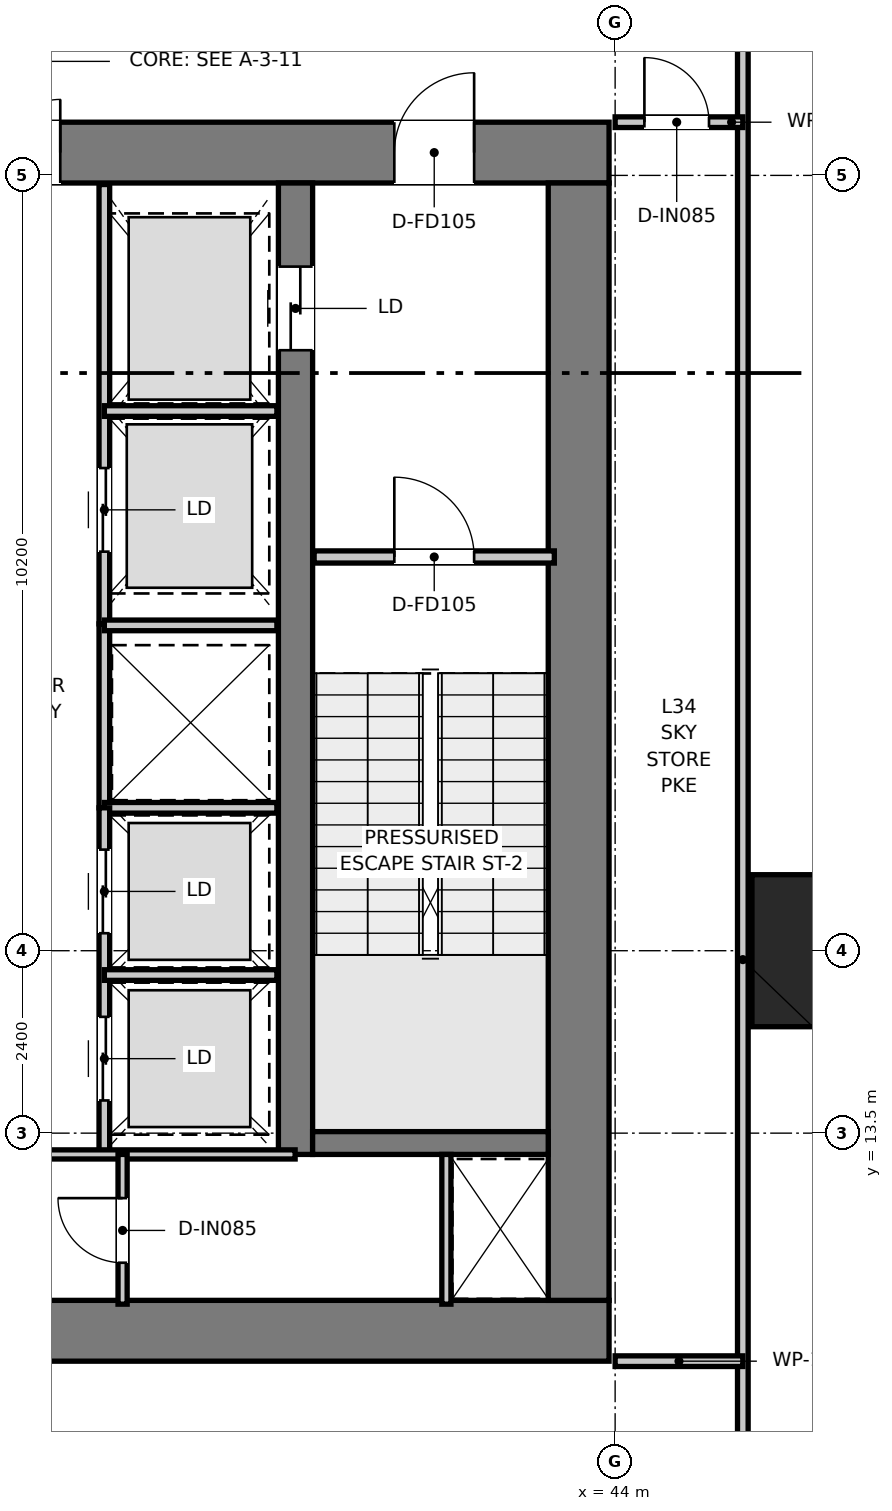
"""IFC4 building model, lengths in metres.
Left out: names, types, materials, properties, quantities, classifications, styles, units other than length and angle.
Written with IfcOpenShell. Run it as: python <this file> out.ifc"""

import sys

from ifc_helpers import new_model, si_unit, direction, frame, frame_2d, origin, origin_2d, place, context, subcontext, project, spatial, rectangle, extrude, source, transform, mapped, element, fill, save


model = new_model("IFC4")
c1 = context("Model", 3, precision=1e-05, world=origin(), true_north=direction((0.0, 1.0)))
c2 = subcontext(c1, "Body", "Model", "MODEL_VIEW")
j1 = project(units=[si_unit("LENGTHUNIT", "METRE"), si_unit("PLANEANGLEUNIT", "RADIAN")], contexts=[c1])
p1 = place(None, origin())
s1 = spatial("IfcSite", under=j1, at=p1, CompositionType="ELEMENT")
p2 = place(p1, origin())
s2 = spatial("IfcBuilding", under=s1, at=p2, CompositionType="ELEMENT")
p3 = place(p2, frame((0.0, 0.0, 141.4)))
s3 = spatial("IfcBuildingStorey", under=s2, at=p3, CompositionType="ELEMENT", Elevation=141.4)
p4 = place(p3, frame((28.08, 10.9, 0.0), z_axis=(0.0, 0.0, 1.0), x_axis=(1.0, 0.0, 0.0)))
e1 = element("IfcWall", 1, at=p4, inside=s3, PredefinedType="SHEAR", context=c2, shape_type="SweptSolid", body=[
    extrude(rectangle(XDim=15.84, YDim=0.8, at=frame_2d((7.92, 0.0))), origin(), (0.0, 0.0, 1.0), 4.8),
])
p5 = place(p3, frame((28.08, 26.4, 0.0), z_axis=(0.0, 0.0, 1.0), x_axis=(1.0, 0.0, 0.0)))
e2 = element("IfcWall", 2, at=p5, inside=s3, PredefinedType="SHEAR", context=c2, shape_type="SweptSolid", body=[
    extrude(rectangle(XDim=15.84, YDim=0.8, at=frame_2d((7.92, 0.0))), origin(), (0.0, 0.0, 1.0), 4.8),
])
p6 = place(p5, frame((7.22, 0.0, 0.0)))
e3 = element("IfcOpeningElement", 3, at=p6, cuts=e2, PredefinedType="OPENING", context=c2, shape_type="SweptSolid", body=[
    extrude(rectangle(XDim=1.4, YDim=2.2, at=frame_2d((0.7, 1.1))), frame((0.0, 0.41, 0.0), z_axis=(0.0, -1.0, 0.0), x_axis=(1.0, 0.0, 0.0)), (0.0, 0.0, 1.0), 0.82),
])
p7 = place(p5, frame((1.775, 0.0, 0.0)))
e4 = element("IfcOpeningElement", 4, at=p7, cuts=e2, PredefinedType="OPENING", context=c2, shape_type="SweptSolid", body=[
    extrude(rectangle(XDim=1.05, YDim=2.1, at=frame_2d((0.525, 1.05))), frame((0.0, 0.41, 0.0), z_axis=(0.0, -1.0, 0.0), x_axis=(1.0, 0.0, 0.0)), (0.0, 0.0, 1.0), 0.82),
])
p8 = place(p5, frame((13.015, 0.0, 0.0)))
e5 = element("IfcOpeningElement", 5, at=p8, cuts=e2, PredefinedType="OPENING", context=c2, shape_type="SweptSolid", body=[
    extrude(rectangle(XDim=1.05, YDim=2.1, at=frame_2d((0.525, 1.05))), frame((0.0, 0.41, 0.0), z_axis=(0.0, -1.0, 0.0), x_axis=(1.0, 0.0, 0.0)), (0.0, 0.0, 1.0), 0.82),
])
p9 = place(p3, frame((43.52, 11.3, 0.0), z_axis=(0.0, 0.0, 1.0), x_axis=(0.0, 1.0, 0.0)))
e6 = element("IfcWall", 6, at=p9, inside=s3, PredefinedType="SHEAR", context=c2, shape_type="SweptSolid", body=[
    extrude(rectangle(XDim=14.7, YDim=0.8, at=frame_2d((7.35, 0.0))), origin(), (0.0, 0.0, 1.0), 4.8),
])
p10 = place(p3, frame((39.795, 13.22, 0.0), z_axis=(0.0, 0.0, 1.0), x_axis=(0.0, 1.0, 0.0)))
e7 = element("IfcWall", 7, at=p10, inside=s3, PredefinedType="SHEAR", context=c2, shape_type="SweptSolid", body=[
    extrude(rectangle(XDim=12.78, YDim=0.45, at=frame_2d((6.39, 0.0))), origin(), (0.0, 0.0, 1.0), 4.8),
])
p11 = place(p10, frame((10.58, 0.0, 0.0)))
e8 = element("IfcOpeningElement", 8, at=p11, cuts=e7, PredefinedType="OPENING", context=c2, shape_type="SweptSolid", body=[
    extrude(rectangle(XDim=1.1, YDim=2.15, at=frame_2d((0.55, 1.075))), frame((0.0, 0.235, 0.0), z_axis=(0.0, -1.0, 0.0), x_axis=(1.0, 0.0, 0.0)), (0.0, 0.0, 1.0), 0.47),
])
p12 = place(p3, frame((40.02, 13.37, 0.0), z_axis=(0.0, 0.0, 1.0), x_axis=(1.0, 0.0, 0.0)))
e9 = element("IfcWall", 9, at=p12, inside=s3, PredefinedType="SHEAR", context=c2, shape_type="SweptSolid", body=[
    extrude(rectangle(XDim=3.1, YDim=0.3, at=frame_2d((1.55, 0.0))), origin(), (0.0, 0.0, 1.0), 4.8),
])
m1 = source(origin(), c2, "Body", "SweptSolid", [
    extrude(rectangle(XDim=2.0, YDim=2.0, at=origin_2d()), origin(), (0.0, 0.0, 1.0), 4.8),
])
p13 = place(p3, frame((46.8, 15.9, 0.0), z_axis=(0.0, 0.0, 1.0), x_axis=(1.0, 0.0, 0.0)))
e10 = element("IfcColumn", 10, at=p13, inside=s3, PredefinedType="USERDEFINED", context=c2, shape_type="MappedRepresentation", body=[
    mapped(m1, transform((0.0, 0.0, 0.0), x_axis=(1.0, 0.0, 0.0), y_axis=(0.0, 1.0, 0.0), z_axis=(0.0, 0.0, 1.0), scale=1.0)),
])
p14 = place(p3, frame((40.04, 21.08, 0.0), z_axis=(0.0, 0.0, 1.0), x_axis=(1.0, 0.0, 0.0)))
e11 = element("IfcWall", 11, at=p14, inside=s3, PredefinedType="PARTITIONING", context=c2, shape_type="SweptSolid", body=[
    extrude(rectangle(XDim=3.16, YDim=0.16, at=frame_2d((1.58, 0.0))), origin(), (0.0, 0.0, 1.0), 4.52),
])
p15 = place(p14, frame((1.055, 0.0, 0.0)))
e12 = element("IfcOpeningElement", 12, at=p15, cuts=e11, PredefinedType="OPENING", context=c2, shape_type="SweptSolid", body=[
    extrude(rectangle(XDim=1.05, YDim=2.1, at=frame_2d((0.525, 1.05))), frame((0.0, 0.09, 0.0), z_axis=(0.0, -1.0, 0.0), x_axis=(1.0, 0.0, 0.0)), (0.0, 0.0, 1.0), 0.18),
])
p16 = place(p3, frame((37.28, 20.2, 0.0), z_axis=(0.0, 0.0, 1.0), x_axis=(0.0, 1.0, 0.0)))
e13 = element("IfcWall", 13, at=p16, inside=s3, PredefinedType="PARTITIONING", context=c2, shape_type="SweptSolid", body=[
    extrude(rectangle(XDim=5.78, YDim=0.14, at=frame_2d((2.89, 0.0))), origin(), (0.0, 0.0, 1.0), 3.52),
])
p17 = place(p16, frame((0.95, 0.0, 0.0)))
e14 = element("IfcOpeningElement", 14, at=p17, cuts=e13, PredefinedType="OPENING", context=c2, shape_type="SweptSolid", body=[
    extrude(rectangle(XDim=1.1, YDim=2.15, at=frame_2d((0.55, 1.075))), frame((0.0, 0.08, 0.0), z_axis=(0.0, -1.0, 0.0), x_axis=(1.0, 0.0, 0.0)), (0.0, 0.0, 1.0), 0.16),
])
p18 = place(p3, frame((37.28, 23.0, 0.0), z_axis=(0.0, 0.0, 1.0), x_axis=(1.0, 0.0, 0.0)))
e15 = element("IfcWall", 15, at=p18, inside=s3, PredefinedType="PARTITIONING", context=c2, shape_type="SweptSolid", body=[
    extrude(rectangle(XDim=2.27, YDim=0.14, at=frame_2d((1.135, 0.0))), origin(), (0.0, 0.0, 1.0), 3.52),
])
p19 = place(p3, frame((37.28, 17.78, 0.0), z_axis=(0.0, 0.0, 1.0), x_axis=(0.0, 1.0, 0.0)))
e16 = element("IfcWall", 16, at=p19, inside=s3, PredefinedType="PARTITIONING", context=c2, shape_type="SweptSolid", body=[
    extrude(rectangle(XDim=2.42, YDim=0.14, at=frame_2d((1.21, 0.0))), origin(), (0.0, 0.0, 1.0), 4.52),
])
for number, where, z_axis, x_axis in (
    (17, (37.28, 17.78, 0.0), (0.0, 0.0, 1.0), (1.0, 0.0, 0.0)),
    (18, (37.28, 20.18, 0.0), (0.0, 0.0, 1.0), (1.0, 0.0, 0.0)),
):
    element("IfcWall", number, at=place(p3, frame(where, z_axis=z_axis, x_axis=x_axis)), inside=s3, PredefinedType="PARTITIONING", context=c2, shape_type="SweptSolid", body=[
        extrude(rectangle(XDim=2.27, YDim=0.14, at=frame_2d((1.135, 0.0))), origin(), (0.0, 0.0, 1.0), 4.52),
    ])
p20 = place(p3, frame((37.28, 13.22, 0.0), z_axis=(0.0, 0.0, 1.0), x_axis=(0.0, 1.0, 0.0)))
e19 = element("IfcWall", 19, at=p20, inside=s3, PredefinedType="PARTITIONING", context=c2, shape_type="SweptSolid", body=[
    extrude(rectangle(XDim=4.56, YDim=0.14, at=frame_2d((2.28, 0.0))), origin(), (0.0, 0.0, 1.0), 4.52),
])
p21 = place(p20, frame((0.71, 0.0, 0.0)))
e20 = element("IfcOpeningElement", 20, at=p21, cuts=e19, PredefinedType="OPENING", context=c2, shape_type="SweptSolid", body=[
    extrude(rectangle(XDim=1.1, YDim=2.15, at=frame_2d((0.55, 1.075))), frame((0.0, 0.08, 0.0), z_axis=(0.0, -1.0, 0.0), x_axis=(1.0, 0.0, 0.0)), (0.0, 0.0, 1.0), 0.16),
])
p22 = place(p20, frame((2.91, 0.0, 0.0)))
e21 = element("IfcOpeningElement", 21, at=p22, cuts=e19, PredefinedType="OPENING", context=c2, shape_type="SweptSolid", body=[
    extrude(rectangle(XDim=1.1, YDim=2.15, at=frame_2d((0.55, 1.075))), frame((0.0, 0.08, 0.0), z_axis=(0.0, -1.0, 0.0), x_axis=(1.0, 0.0, 0.0)), (0.0, 0.0, 1.0), 0.16),
])
p23 = place(p3, frame((37.28, 15.58, 0.0), z_axis=(0.0, 0.0, 1.0), x_axis=(1.0, 0.0, 0.0)))
e22 = element("IfcWall", 22, at=p23, inside=s3, PredefinedType="PARTITIONING", context=c2, shape_type="SweptSolid", body=[
    extrude(rectangle(XDim=2.27, YDim=0.14, at=frame_2d((1.135, 0.0))), origin(), (0.0, 0.0, 1.0), 4.52),
])
p24 = place(p3, frame((41.78, 11.25, 0.0), z_axis=(0.0, 0.0, 1.0), x_axis=(0.0, 1.0, 0.0)))
e23 = element("IfcWall", 23, at=p24, inside=s3, PredefinedType="PARTITIONING", context=c2, shape_type="SweptSolid", body=[
    extrude(rectangle(XDim=1.97, YDim=0.12, at=frame_2d((0.985, 0.0))), origin(), (0.0, 0.0, 1.0), 4.52),
])
p25 = place(p3, frame((32.21, 13.22, 0.0), z_axis=(0.0, 0.0, 1.0), x_axis=(1.0, 0.0, 0.0)))
e24 = element("IfcWall", 24, at=p25, inside=s3, PredefinedType="PARTITIONING", context=c2, shape_type="SweptSolid", body=[
    extrude(rectangle(XDim=7.58, YDim=0.12, at=frame_2d((3.79, 0.0))), origin(), (0.0, 0.0, 1.0), 4.52),
])
p26 = place(p25, frame((3.365, 0.0, 0.0)))
e25 = element("IfcOpeningElement", 25, at=p26, cuts=e24, PredefinedType="OPENING", context=c2, shape_type="SweptSolid", body=[
    extrude(rectangle(XDim=0.85, YDim=2.1, at=frame_2d((0.425, 1.05))), frame((0.0, 0.07, 0.0), z_axis=(0.0, -1.0, 0.0), x_axis=(1.0, 0.0, 0.0)), (0.0, 0.0, 1.0), 0.14),
])
p27 = place(p3, frame((37.52, 11.25, 0.0), z_axis=(0.0, 0.0, 1.0), x_axis=(0.0, 1.0, 0.0)))
e26 = element("IfcWall", 26, at=p27, inside=s3, PredefinedType="PARTITIONING", context=c2, shape_type="SweptSolid", body=[
    extrude(rectangle(XDim=1.97, YDim=0.12, at=frame_2d((0.985, 0.0))), origin(), (0.0, 0.0, 1.0), 4.52),
])
p28 = place(p27, frame((0.545, 0.0, 0.0)))
e27 = element("IfcOpeningElement", 27, at=p28, cuts=e26, PredefinedType="OPENING", context=c2, shape_type="SweptSolid", body=[
    extrude(rectangle(XDim=0.85, YDim=2.1, at=frame_2d((0.425, 1.05))), frame((0.0, 0.07, 0.0), z_axis=(0.0, -1.0, 0.0), x_axis=(1.0, 0.0, 0.0)), (0.0, 0.0, 1.0), 0.14),
])
p29 = place(p3, frame((45.68, 0.765, 0.0), z_axis=(0.0, 0.0, 1.0), x_axis=(0.0, 1.0, 0.0)))
e28 = element("IfcWall", 28, at=p29, inside=s3, PredefinedType="PARTITIONING", context=c2, shape_type="SweptSolid", body=[
    extrude(rectangle(XDim=47.145, YDim=0.14, at=frame_2d((23.573, 0.0))), origin(), (0.0, 0.0, 1.0), 3.82),
])
p30 = place(p29, frame((30.185, 0.0, 0.0)))
e29 = element("IfcOpeningElement", 29, at=p30, cuts=e28, PredefinedType="OPENING", context=c2, shape_type="SweptSolid", body=[
    extrude(rectangle(XDim=1.1, YDim=2.15, at=frame_2d((0.55, 1.075))), frame((0.0, 0.08, 0.0), z_axis=(0.0, -1.0, 0.0), x_axis=(1.0, 0.0, 0.0)), (0.0, 0.0, 1.0), 0.16),
])
p31 = place(p3, frame((44.0, 26.8, 0.0), z_axis=(0.0, 0.0, 1.0), x_axis=(1.0, 0.0, 0.0)))
e30 = element("IfcWall", 30, at=p31, inside=s3, PredefinedType="PARTITIONING", context=c2, shape_type="SweptSolid", body=[
    extrude(rectangle(XDim=1.68, YDim=0.14, at=frame_2d((0.84, 0.0))), origin(), (0.0, 0.0, 1.0), 3.93),
])
p32 = place(p31, frame((0.385, 0.0, 0.0)))
e31 = element("IfcOpeningElement", 31, at=p32, cuts=e30, PredefinedType="OPENING", context=c2, shape_type="SweptSolid", body=[
    extrude(rectangle(XDim=0.85, YDim=2.1, at=frame_2d((0.425, 1.05))), frame((0.0, 0.08, 0.0), z_axis=(0.0, -1.0, 0.0), x_axis=(1.0, 0.0, 0.0)), (0.0, 0.0, 1.0), 0.16),
])
p33 = place(p3, frame((44.0, 10.5, 0.0), z_axis=(0.0, 0.0, 1.0), x_axis=(1.0, 0.0, 0.0)))
e32 = element("IfcWall", 32, at=p33, inside=s3, PredefinedType="PARTITIONING", context=c2, shape_type="SweptSolid", body=[
    extrude(rectangle(XDim=1.68, YDim=0.14, at=frame_2d((0.84, 0.0))), origin(), (0.0, 0.0, 1.0), 4.52),
])
p34 = place(p15, origin())
e33 = element("IfcDoor", 33, at=p34, inside=s3, OperationType="SINGLE_SWING_LEFT", PredefinedType="DOOR", context=c2, shape_type="SweptSolid", body=[
    extrude(rectangle(XDim=1.05, YDim=2.1, at=frame_2d((0.525, 1.05))), frame((0.0, 0.025, 0.0), z_axis=(0.0, -1.0, 0.0), x_axis=(1.0, 0.0, 0.0)), (0.0, 0.0, 1.0), 0.05),
])
fill(e12, e33)
p35 = place(p6, origin())
e34 = element("IfcDoor", 34, at=p35, inside=s3, OperationType="DOUBLE_DOOR_SINGLE_SWING", PredefinedType="DOOR", context=c2, shape_type="SweptSolid", body=[
    extrude(rectangle(XDim=1.4, YDim=2.2, at=frame_2d((0.7, 1.1))), frame((0.0, 0.025, 0.0), z_axis=(0.0, -1.0, 0.0), x_axis=(1.0, 0.0, 0.0)), (0.0, 0.0, 1.0), 0.05),
])
fill(e3, e34)
p36 = place(p8, origin())
e35 = element("IfcDoor", 35, at=p36, inside=s3, OperationType="SINGLE_SWING_RIGHT", PredefinedType="DOOR", context=c2, shape_type="SweptSolid", body=[
    extrude(rectangle(XDim=1.05, YDim=2.1, at=frame_2d((0.525, 1.05))), frame((0.0, 0.025, 0.0), z_axis=(0.0, -1.0, 0.0), x_axis=(1.0, 0.0, 0.0)), (0.0, 0.0, 1.0), 0.05),
])
fill(e5, e35)
p37 = place(p11, origin())
e36 = element("IfcDoor", 36, at=p37, inside=s3, OperationType="DOUBLE_DOOR_SLIDING", PredefinedType="DOOR", context=c2, shape_type="SweptSolid", body=[
    extrude(rectangle(XDim=1.1, YDim=2.15, at=frame_2d((0.55, 1.075))), frame((0.0, 0.025, 0.0), z_axis=(0.0, -1.0, 0.0), x_axis=(1.0, 0.0, 0.0)), (0.0, 0.0, 1.0), 0.05),
])
fill(e8, e36)
p38 = place(p17, origin())
e37 = element("IfcDoor", 37, at=p38, inside=s3, OperationType="DOUBLE_DOOR_SLIDING", PredefinedType="DOOR", context=c2, shape_type="SweptSolid", body=[
    extrude(rectangle(XDim=1.1, YDim=2.15, at=frame_2d((0.55, 1.075))), frame((0.0, 0.025, 0.0), z_axis=(0.0, -1.0, 0.0), x_axis=(1.0, 0.0, 0.0)), (0.0, 0.0, 1.0), 0.05),
])
fill(e14, e37)
p39 = place(p21, origin())
e38 = element("IfcDoor", 38, at=p39, inside=s3, OperationType="DOUBLE_DOOR_SLIDING", PredefinedType="DOOR", context=c2, shape_type="SweptSolid", body=[
    extrude(rectangle(XDim=1.1, YDim=2.15, at=frame_2d((0.55, 1.075))), frame((0.0, 0.025, 0.0), z_axis=(0.0, -1.0, 0.0), x_axis=(1.0, 0.0, 0.0)), (0.0, 0.0, 1.0), 0.05),
])
fill(e20, e38)
p40 = place(p22, origin())
e39 = element("IfcDoor", 39, at=p40, inside=s3, OperationType="DOUBLE_DOOR_SLIDING", PredefinedType="DOOR", context=c2, shape_type="SweptSolid", body=[
    extrude(rectangle(XDim=1.1, YDim=2.15, at=frame_2d((0.55, 1.075))), frame((0.0, 0.025, 0.0), z_axis=(0.0, -1.0, 0.0), x_axis=(1.0, 0.0, 0.0)), (0.0, 0.0, 1.0), 0.05),
])
fill(e21, e39)
p41 = place(p28, origin())
e40 = element("IfcDoor", 40, at=p41, inside=s3, OperationType="SINGLE_SWING_RIGHT", PredefinedType="DOOR", context=c2, shape_type="SweptSolid", body=[
    extrude(rectangle(XDim=0.85, YDim=2.1, at=frame_2d((0.425, 1.05))), frame((0.0, 0.025, 0.0), z_axis=(0.0, -1.0, 0.0), x_axis=(1.0, 0.0, 0.0)), (0.0, 0.0, 1.0), 0.05),
])
fill(e27, e40)
p42 = place(p32, origin())
e41 = element("IfcDoor", 41, at=p42, inside=s3, OperationType="SINGLE_SWING_LEFT", PredefinedType="DOOR", context=c2, shape_type="SweptSolid", body=[
    extrude(rectangle(XDim=0.85, YDim=2.1, at=frame_2d((0.425, 1.05))), frame((0.0, 0.025, 0.0), z_axis=(0.0, -1.0, 0.0), x_axis=(1.0, 0.0, 0.0)), (0.0, 0.0, 1.0), 0.05),
])
fill(e31, e41)
save(model, sys.argv[1])
